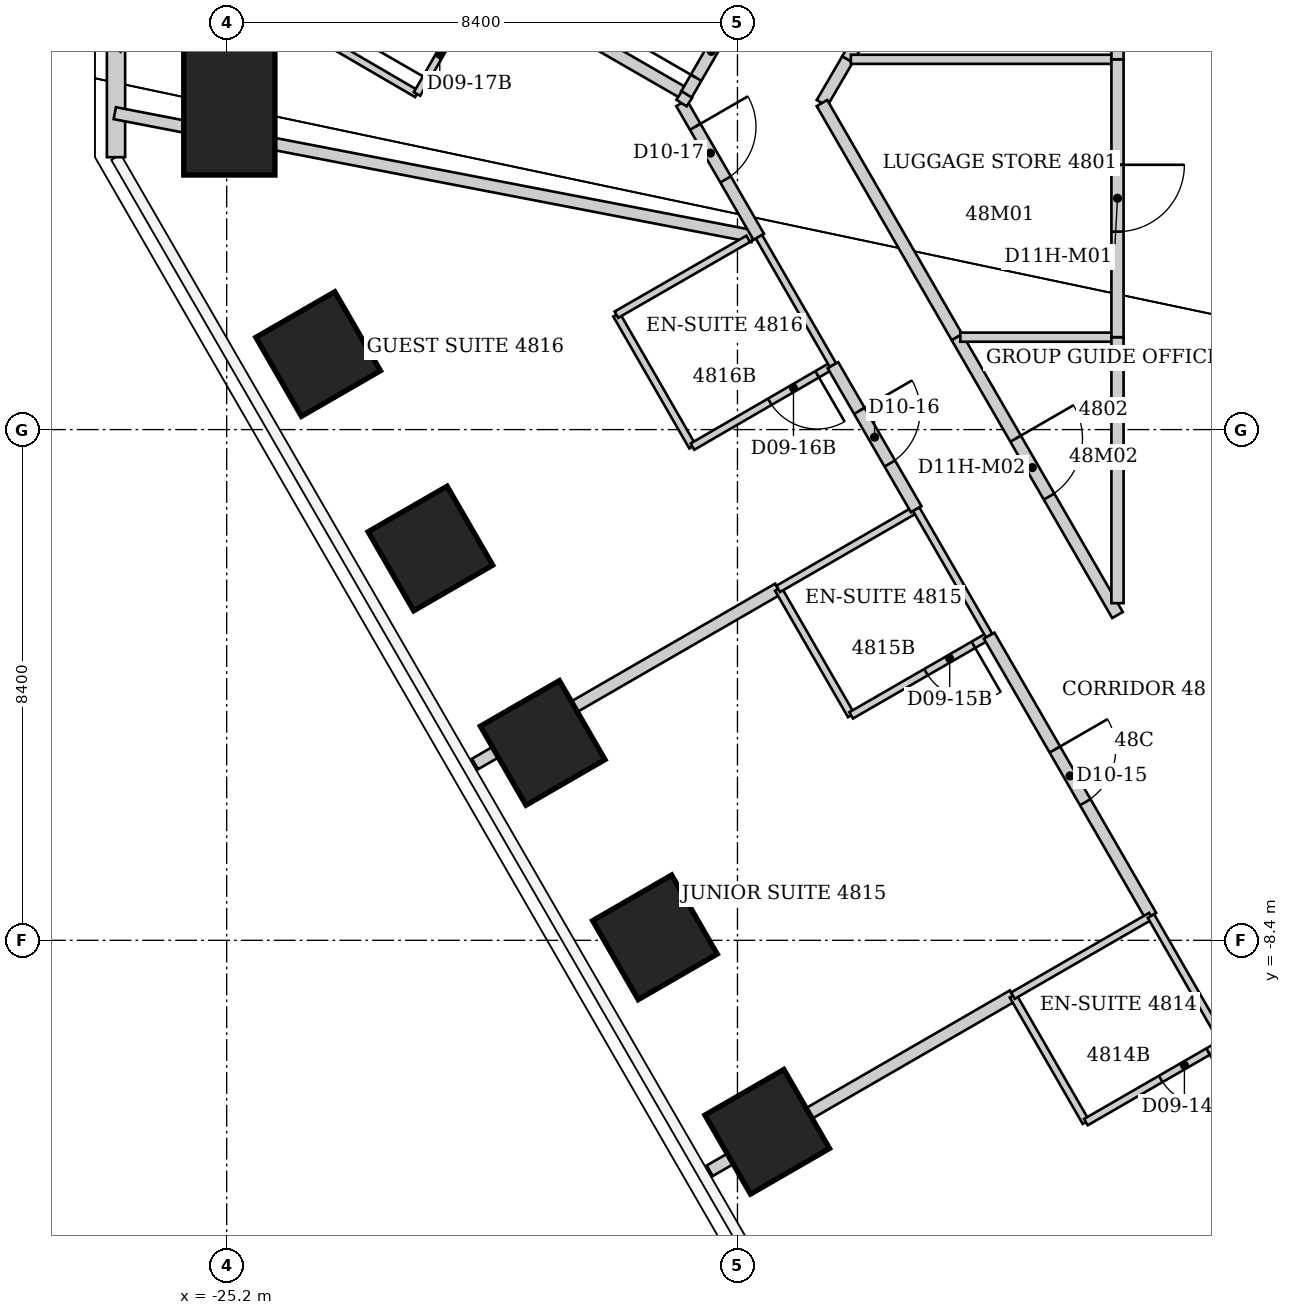
"""IFC4 building model, lengths in metres.
Left out: names, types, materials, properties, quantities, classifications, styles, units other than length and angle.
Written with IfcOpenShell. Run it as: python <this file> out.ifc"""

import sys

from ifc_helpers import new_model, si_unit, direction, frame, frame_2d, origin, origin_2d, place, context, subcontext, project, spatial, rectangle, extrude, element, fill, save


model = new_model("IFC4")
c1 = context("Model", 3, precision=1e-05, world=origin(), true_north=direction((0.0, 1.0)))
c2 = subcontext(c1, "Body", "Model", "MODEL_VIEW")
j1 = project(units=[si_unit("LENGTHUNIT", "METRE"), si_unit("PLANEANGLEUNIT", "RADIAN")], contexts=[c1])
p1 = place(None, origin())
s1 = spatial("IfcSite", under=j1, at=p1, CompositionType="ELEMENT")
p2 = place(p1, origin())
s2 = spatial("IfcBuilding", under=s1, at=p2, CompositionType="ELEMENT")
p3 = place(p2, frame((0.0, 0.0, 194.6)))
s3 = spatial("IfcBuildingStorey", under=s2, at=p3, CompositionType="ELEMENT", Elevation=194.6)
for number, where, z_axis, x_axis in (
    (1, (-16.311, -11.549, 0.0), (0.0, 0.0, 1.0), (-0.866, -0.5, 0.0)),
    (2, (-18.157, -8.351, 0.0), (0.0, 0.0, 1.0), (-0.866, -0.5, 0.0)),
    (3, (-20.003, -5.153, 0.0), (0.0, 0.0, 1.0), (-0.866, -0.5, 0.0)),
    (4, (-21.85, -1.956, 0.0), (0.0, 0.0, 1.0), (-0.866, -0.5, 0.0)),
    (5, (-23.696, 1.242, 0.0), (0.0, 0.0, 1.0), (-0.866, -0.5, 0.0)),
):
    element("IfcColumn", number, at=place(p3, frame(where, z_axis=z_axis, x_axis=x_axis)), inside=s3, PredefinedType="COLUMN", context=c2, shape_type="SweptSolid", body=[
        extrude(rectangle(XDim=1.5, YDim=1.5, at=origin_2d()), origin(), (0.0, 0.0, 1.0), 3.8),
    ])
p4 = place(p3, frame((-25.156, 5.311, 0.0), z_axis=(0.0, 0.0, 1.0), x_axis=(-1.0, 0.0, 0.0)))
e6 = element("IfcColumn", 6, at=p4, inside=s3, PredefinedType="COLUMN", context=c2, shape_type="SweptSolid", body=[
    extrude(rectangle(XDim=1.5, YDim=2.25, at=origin_2d()), origin(), (0.0, 0.0, 1.0), 3.8),
])
p5 = place(p3, frame((-27.02, 4.48, 0.0), z_axis=(0.0, 0.0, 1.0), x_axis=(0.0, 1.0, 0.0)))
e7 = element("IfcWall", 7, at=p5, inside=s3, PredefinedType="SOLIDWALL", context=c2, shape_type="SweptSolid", body=[
    extrude(rectangle(XDim=1.77, YDim=0.3, at=frame_2d((0.885, 0.0))), origin(), (0.0, 0.0, 1.0), 3.64),
])
p6 = place(p3, frame((-27.041, 5.204, 0.0), z_axis=(0.0, 0.0, 1.0), x_axis=(0.981884490433, -0.18948046719, 0.0)))
e8 = element("IfcWall", 8, at=p6, inside=s3, PredefinedType="PARTITIONING", context=c2, shape_type="SweptSolid", body=[
    extrude(rectangle(XDim=10.684, YDim=0.2, at=frame_2d((5.342, 0.0))), origin(), (0.0, 0.0, 1.0), 3.64),
])
p7 = place(p3, frame((-23.63, 6.43, 0.0), z_axis=(0.0, 0.0, 1.0), x_axis=(0.863773997337, -0.503879431535, 0.0)))
e9 = element("IfcWall", 9, at=p7, inside=s3, PredefinedType="PARTITIONING", context=c2, shape_type="SweptSolid", body=[
    extrude(rectangle(XDim=1.806, YDim=0.12, at=frame_2d((0.903, 0.0))), origin(), (0.0, 0.0, 1.0), 3.64),
])
p8 = place(p3, frame((-22.07, 5.52, 0.0), z_axis=(0.0, 0.0, 1.0), x_axis=(0.499118212815, 0.866533905648, 0.0)))
e10 = element("IfcWall", 10, at=p8, inside=s3, PredefinedType="PARTITIONING", context=c2, shape_type="SweptSolid", body=[
    extrude(rectangle(XDim=2.204, YDim=0.12, at=frame_2d((1.102, 0.0))), origin(), (0.0, 0.0, 1.0), 3.64),
])
p9 = place(p8, frame((0.3, 0.0, 0.0)))
e11 = element("IfcOpeningElement", 11, at=p9, cuts=e10, PredefinedType="OPENING", context=c2, shape_type="SweptSolid", body=[
    extrude(rectangle(XDim=0.9, YDim=2.03, at=frame_2d((0.45, 1.015))), frame((0.0, 0.06, 0.0), z_axis=(0.0, -1.0, 0.0), x_axis=(1.0, 0.0, 0.0)), (0.0, 0.0, 1.0), 0.12),
])
p10 = place(p3, frame((-21.116, -5.5, 0.0), z_axis=(0.0, 0.0, 1.0), x_axis=(0.865919350456, 0.50018364478, 0.0)))
e12 = element("IfcWall", 12, at=p10, inside=s3, PredefinedType="PARTITIONING", context=c2, shape_type="SweptSolid", body=[
    extrude(rectangle(XDim=5.758, YDim=0.2, at=frame_2d((2.879, 0.0))), origin(), (0.0, 0.0, 1.0), 3.64),
])
p11 = place(p3, frame((-20.97, 7.43, 0.0), z_axis=(0.0, 0.0, 1.0), x_axis=(0.866325681624, -0.499479542482, 0.0)))
e13 = element("IfcWall", 13, at=p11, inside=s3, PredefinedType="PARTITIONING", context=c2, shape_type="SweptSolid", body=[
    extrude(rectangle(XDim=3.829, YDim=0.2, at=frame_2d((1.914, 0.0))), origin(), (0.0, 0.0, 1.0), 3.64),
])
p12 = place(p3, frame((-18.79, 1.89, 0.0), z_axis=(0.0, 0.0, 1.0), x_axis=(0.499159685399, -0.866510016372, 0.0)))
e14 = element("IfcWall", 14, at=p12, inside=s3, PredefinedType="PARTITIONING", context=c2, shape_type="SweptSolid", body=[
    extrude(rectangle(XDim=2.504, YDim=0.12, at=frame_2d((1.252, 0.0))), origin(), (0.0, 0.0, 1.0), 3.64),
])
p13 = place(p3, frame((-17.72, 5.37, 0.0), z_axis=(0.0, 0.0, 1.0), x_axis=(0.499922110319, -0.866070368743, 0.0)))
e15 = element("IfcWall", 15, at=p13, inside=s3, PredefinedType="PARTITIONING", context=c2, shape_type="SweptSolid", body=[
    extrude(rectangle(XDim=2.541, YDim=0.2, at=frame_2d((1.27, 0.0))), origin(), (0.0, 0.0, 1.0), 3.64),
])
p14 = place(p13, frame((0.45, 0.0, 0.0)))
e16 = element("IfcOpeningElement", 16, at=p14, cuts=e15, PredefinedType="OPENING", context=c2, shape_type="SweptSolid", body=[
    extrude(rectangle(XDim=1.0, YDim=2.13, at=frame_2d((0.5, 1.065))), frame((0.0, 0.1, 0.0), z_axis=(0.0, -1.0, 0.0), x_axis=(1.0, 0.0, 0.0)), (0.0, 0.0, 1.0), 0.2),
])
p15 = place(p3, frame((-17.64, 5.51, 0.0), z_axis=(0.0, 0.0, 1.0), x_axis=(0.500014611105, 0.866016967894, 0.0)))
e17 = element("IfcWall", 17, at=p15, inside=s3, PredefinedType="PARTITIONING", context=c2, shape_type="SweptSolid", body=[
    extrude(rectangle(XDim=1.64, YDim=0.2, at=frame_2d((0.82, 0.0))), origin(), (0.0, 0.0, 1.0), 3.64),
])
p16 = place(p15, frame((0.32, 0.0, 0.0)))
e18 = element("IfcOpeningElement", 18, at=p16, cuts=e17, PredefinedType="OPENING", context=c2, shape_type="SweptSolid", body=[
    extrude(rectangle(XDim=1.0, YDim=2.13, at=frame_2d((0.5, 1.065))), frame((0.0, 0.1, 0.0), z_axis=(0.0, -1.0, 0.0), x_axis=(1.0, 0.0, 0.0)), (0.0, 0.0, 1.0), 0.2),
])
p17 = place(p3, frame((-17.63, 5.51, 0.0), z_axis=(0.0, 0.0, 1.0), x_axis=(-0.541424846284, -0.840749151547, 0.0)))
e19 = element("IfcWall", 19, at=p17, inside=s3, PredefinedType="PARTITIONING", context=c2, shape_type="SweptSolid", body=[
    extrude(rectangle(XDim=0.167, YDim=0.2, at=frame_2d((0.083, 0.0))), origin(), (0.0, 0.0, 1.0), 3.64),
])
p18 = place(p3, frame((-17.54, -0.28, 0.0), z_axis=(0.0, 0.0, 1.0), x_axis=(0.86498992408, 0.501789229896, 0.0)))
e20 = element("IfcWall", 20, at=p18, inside=s3, PredefinedType="PARTITIONING", context=c2, shape_type="SweptSolid", body=[
    extrude(rectangle(XDim=2.671, YDim=0.12, at=frame_2d((1.335, 0.0))), origin(), (0.0, 0.0, 1.0), 3.64),
])
p19 = place(p18, frame((1.47, 0.0, 0.0)))
e21 = element("IfcOpeningElement", 21, at=p19, cuts=e20, PredefinedType="OPENING", context=c2, shape_type="SweptSolid", body=[
    extrude(rectangle(XDim=0.9, YDim=2.03, at=frame_2d((0.45, 1.015))), frame((0.0, 0.06, 0.0), z_axis=(0.0, -1.0, 0.0), x_axis=(1.0, 0.0, 0.0)), (0.0, 0.0, 1.0), 0.12),
])
p20 = place(p3, frame((-17.256, -12.19, 0.0), z_axis=(0.0, 0.0, 1.0), x_axis=(0.865937714159, 0.500151852138, 0.0)))
e22 = element("IfcWall", 22, at=p20, inside=s3, PredefinedType="PARTITIONING", context=c2, shape_type="SweptSolid", body=[
    extrude(rectangle(XDim=5.758, YDim=0.2, at=frame_2d((2.879, 0.0))), origin(), (0.0, 0.0, 1.0), 3.038),
])
p21 = place(p3, frame((-16.624, 3.138, 0.0), z_axis=(0.0, 0.0, 1.0), x_axis=(-0.866525185869, -0.499133351175, 0.0)))
e23 = element("IfcWall", 23, at=p21, inside=s3, PredefinedType="PARTITIONING", context=c2, shape_type="SweptSolid", body=[
    extrude(rectangle(XDim=2.5, YDim=0.12, at=frame_2d((1.25, 0.0))), origin(), (0.0, 0.0, 1.0), 3.038),
])
p22 = place(p3, frame((-16.447, 3.172, 0.0), z_axis=(0.0, 0.0, 1.0), x_axis=(0.499242543719, -0.86646227993, 0.0)))
e24 = element("IfcWall", 24, at=p22, inside=s3, PredefinedType="PARTITIONING", context=c2, shape_type="SweptSolid", body=[
    extrude(rectangle(XDim=2.437, YDim=0.12, at=frame_2d((1.219, 0.0))), origin(), (0.0, 0.0, 1.0), 3.64),
])
p23 = place(p3, frame((-16.13, -2.62, 0.0), z_axis=(0.0, 0.0, 1.0), x_axis=(0.499737123639, -0.866177122335, 0.0)))
e25 = element("IfcWall", 25, at=p23, inside=s3, PredefinedType="PARTITIONING", context=c2, shape_type="SweptSolid", body=[
    extrude(rectangle(XDim=2.401, YDim=0.12, at=frame_2d((1.201, 0.0))), origin(), (0.0, 0.0, 1.0), 3.64),
])
p24 = place(p3, frame((-16.13, -2.62, 0.0), z_axis=(0.0, 0.0, 1.0), x_axis=(0.866114241029, 0.499846097802, 0.0)))
e26 = element("IfcWall", 26, at=p24, inside=s3, PredefinedType="PARTITIONING", context=c2, shape_type="SweptSolid", body=[
    extrude(rectangle(XDim=2.621, YDim=0.12, at=frame_2d((1.311, 0.0))), origin(), (0.0, 0.0, 1.0), 3.64),
])
p25 = place(p3, frame((-15.41, 5.37, 0.0), z_axis=(0.0, 0.0, 1.0), x_axis=(0.503943891868, 0.863736391412, 0.0)))
e27 = element("IfcWall", 27, at=p25, inside=s3, PredefinedType="PARTITIONING", context=c2, shape_type="SweptSolid", body=[
    extrude(rectangle(XDim=0.833, YDim=0.2, at=frame_2d((0.417, 0.0))), origin(), (0.0, 0.0, 1.0), 3.64),
])
p26 = place(p3, frame((-15.23, 1.06, 0.0), z_axis=(0.0, 0.0, 1.0), x_axis=(0.500406860043, -0.865790375565, 0.0)))
e28 = element("IfcWall", 28, at=p26, inside=s3, PredefinedType="PARTITIONING", context=c2, shape_type="SweptSolid", body=[
    extrude(rectangle(XDim=2.738, YDim=0.2, at=frame_2d((1.369, 0.0))), origin(), (0.0, 0.0, 1.0), 3.64),
])
p27 = place(p26, frame((0.869, 0.0, 0.0)))
e29 = element("IfcOpeningElement", 29, at=p27, cuts=e28, PredefinedType="OPENING", context=c2, shape_type="SweptSolid", body=[
    extrude(rectangle(XDim=1.0, YDim=2.13, at=frame_2d((0.5, 1.065))), frame((0.0, 0.1, 0.0), z_axis=(0.0, -1.0, 0.0), x_axis=(1.0, 0.0, 0.0)), (0.0, 0.0, 1.0), 0.2),
])
p28 = place(p3, frame((-14.99, 6.09, 0.0), z_axis=(0.0, 0.0, 1.0), x_axis=(0.500213626659, 0.86590203124, 0.0)))
e30 = element("IfcWall", 30, at=p28, inside=s3, PredefinedType="PARTITIONING", context=c2, shape_type="SweptSolid", body=[
    extrude(rectangle(XDim=5.278, YDim=0.2, at=frame_2d((2.639, 0.0))), origin(), (0.0, 0.0, 1.0), 3.64),
])
p29 = place(p3, frame((-14.935, 6.09, 0.0), z_axis=(0.0, 0.0, 1.0), x_axis=(1.0, 0.0, 0.0)))
e31 = element("IfcWall", 31, at=p29, inside=s3, PredefinedType="PARTITIONING", context=c2, shape_type="SweptSolid", body=[
    extrude(rectangle(XDim=4.385, YDim=0.15, at=frame_2d((2.192, 0.0))), origin(), (0.0, 0.0, 1.0), 3.64),
])
p30 = place(p3, frame((-14.93, -4.7, 0.0), z_axis=(0.0, 0.0, 1.0), x_axis=(0.866114241029, 0.499846097802, 0.0)))
e32 = element("IfcWall", 32, at=p30, inside=s3, PredefinedType="PARTITIONING", context=c2, shape_type="SweptSolid", body=[
    extrude(rectangle(XDim=2.621, YDim=0.12, at=frame_2d((1.311, 0.0))), origin(), (0.0, 0.0, 1.0), 3.64),
])
p31 = place(p30, frame((1.421, 0.0, 0.0)))
e33 = element("IfcOpeningElement", 33, at=p31, cuts=e32, PredefinedType="OPENING", context=c2, shape_type="SweptSolid", body=[
    extrude(rectangle(XDim=0.9, YDim=2.03, at=frame_2d((0.45, 1.015))), frame((0.0, 0.06, 0.0), z_axis=(0.0, -1.0, 0.0), x_axis=(1.0, 0.0, 0.0)), (0.0, 0.0, 1.0), 0.12),
])
p32 = place(p3, frame((-13.86, -1.31, 0.0), z_axis=(0.0, 0.0, 1.0), x_axis=(0.499813401482, -0.866133109688, 0.0)))
e34 = element("IfcWall", 34, at=p32, inside=s3, PredefinedType="PARTITIONING", context=c2, shape_type="SweptSolid", body=[
    extrude(rectangle(XDim=2.401, YDim=0.12, at=frame_2d((1.201, 0.0))), origin(), (0.0, 0.0, 1.0), 3.64),
])
p33 = place(p3, frame((-13.19, 1.52, 0.0), z_axis=(0.0, 0.0, 1.0), x_axis=(-0.499513190454, 0.866306281036, 0.0)))
e35 = element("IfcWall", 35, at=p33, inside=s3, PredefinedType="PARTITIONING", context=c2, shape_type="SweptSolid", body=[
    extrude(rectangle(XDim=4.444, YDim=0.2, at=frame_2d((2.222, 0.0))), origin(), (0.0, 0.0, 1.0), 3.64),
])
p34 = place(p3, frame((-12.66, -3.39, 0.0), z_axis=(0.0, 0.0, 1.0), x_axis=(0.499755544815, -0.866166494057, 0.0)))
e36 = element("IfcWall", 36, at=p34, inside=s3, PredefinedType="PARTITIONING", context=c2, shape_type="SweptSolid", body=[
    extrude(rectangle(XDim=5.323, YDim=0.2, at=frame_2d((2.661, 0.0))), origin(), (0.0, 0.0, 1.0), 3.64),
])
p35 = place(p34, frame((2.161, 0.0, 0.0)))
e37 = element("IfcOpeningElement", 37, at=p35, cuts=e36, PredefinedType="OPENING", context=c2, shape_type="SweptSolid", body=[
    extrude(rectangle(XDim=1.0, YDim=2.13, at=frame_2d((0.5, 1.065))), frame((0.0, 0.1, 0.0), z_axis=(0.0, -1.0, 0.0), x_axis=(1.0, 0.0, 0.0)), (0.0, 0.0, 1.0), 0.2),
])
p36 = place(p3, frame((-12.27, -9.31, 0.0), z_axis=(0.0, 0.0, 1.0), x_axis=(0.499737123639, -0.866177122335, 0.0)))
e38 = element("IfcWall", 38, at=p36, inside=s3, PredefinedType="PARTITIONING", context=c2, shape_type="SweptSolid", body=[
    extrude(rectangle(XDim=2.401, YDim=0.12, at=frame_2d((1.201, 0.0))), origin(), (0.0, 0.0, 1.0), 3.64),
])
p37 = place(p3, frame((-12.27, -9.31, 0.0), z_axis=(0.0, 0.0, 1.0), x_axis=(0.866114241029, 0.499846097802, 0.0)))
e39 = element("IfcWall", 39, at=p37, inside=s3, PredefinedType="PARTITIONING", context=c2, shape_type="SweptSolid", body=[
    extrude(rectangle(XDim=2.621, YDim=0.12, at=frame_2d((1.311, 0.0))), origin(), (0.0, 0.0, 1.0), 3.038),
])
p38 = place(p3, frame((-11.07, -11.39, 0.0), z_axis=(0.0, 0.0, 1.0), x_axis=(0.866154567199, 0.49977621564, 0.0)))
e40 = element("IfcWall", 40, at=p38, inside=s3, PredefinedType="PARTITIONING", context=c2, shape_type="SweptSolid", body=[
    extrude(rectangle(XDim=2.621, YDim=0.12, at=frame_2d((1.311, 0.0))), origin(), (0.0, 0.0, 1.0), 3.64),
])
p39 = place(p38, frame((1.421, 0.0, 0.0)))
e41 = element("IfcOpeningElement", 41, at=p39, cuts=e40, PredefinedType="OPENING", context=c2, shape_type="SweptSolid", body=[
    extrude(rectangle(XDim=0.9, YDim=2.03, at=frame_2d((0.45, 1.015))), frame((0.0, 0.06, 0.0), z_axis=(0.0, -1.0, 0.0), x_axis=(1.0, 0.0, 0.0)), (0.0, 0.0, 1.0), 0.12),
])
p40 = place(p3, frame((-10.55, -3.05, 0.0), z_axis=(0.0, 0.0, 1.0), x_axis=(-0.500193590286, 0.865913605527, 0.0)))
e42 = element("IfcWall", 42, at=p40, inside=s3, PredefinedType="PARTITIONING", context=c2, shape_type="SweptSolid", body=[
    extrude(rectangle(XDim=5.278, YDim=0.2, at=frame_2d((2.639, 0.0))), origin(), (0.0, 0.0, 1.0), 3.64),
])
p41 = place(p40, frame((2.25, 0.0, 0.0)))
e43 = element("IfcOpeningElement", 43, at=p41, cuts=e42, PredefinedType="OPENING", context=c2, shape_type="SweptSolid", body=[
    extrude(rectangle(XDim=1.1, YDim=2.2, at=frame_2d((0.55, 1.1))), frame((0.0, 0.1, 0.0), z_axis=(0.0, -1.0, 0.0), x_axis=(1.0, 0.0, 0.0)), (0.0, 0.0, 1.0), 0.2),
])
p42 = place(p3, frame((-10.55, 1.52, 0.0), z_axis=(0.0, 0.0, 1.0), x_axis=(-1.0, 0.0, 0.0)))
e44 = element("IfcWall", 44, at=p42, inside=s3, PredefinedType="PARTITIONING", context=c2, shape_type="SweptSolid", body=[
    extrude(rectangle(XDim=2.585, YDim=0.15, at=frame_2d((1.292, 0.0))), origin(), (0.0, 0.0, 1.0), 3.64),
])
p43 = place(p3, frame((-10.55, 1.52, 0.0), z_axis=(0.0, 0.0, 1.0), x_axis=(0.0, -1.0, 0.0)))
e45 = element("IfcWall", 45, at=p43, inside=s3, PredefinedType="PARTITIONING", context=c2, shape_type="SweptSolid", body=[
    extrude(rectangle(XDim=4.375, YDim=0.2, at=frame_2d((2.188, 0.0))), origin(), (0.0, 0.0, 1.0), 3.64),
])
p44 = place(p3, frame((-10.55, 6.09, 0.0), z_axis=(0.0, 0.0, 1.0), x_axis=(0.0, -1.0, 0.0)))
e46 = element("IfcWall", 46, at=p44, inside=s3, PredefinedType="PARTITIONING", context=c2, shape_type="SweptSolid", body=[
    extrude(rectangle(XDim=4.57, YDim=0.2, at=frame_2d((2.285, 0.0))), origin(), (0.0, 0.0, 1.0), 3.64),
])
p45 = place(p44, frame((1.735, 0.0, 0.0)))
e47 = element("IfcOpeningElement", 47, at=p45, cuts=e46, PredefinedType="OPENING", context=c2, shape_type="SweptSolid", body=[
    extrude(rectangle(XDim=1.1, YDim=2.2, at=frame_2d((0.55, 1.1))), frame((0.0, 0.1, 0.0), z_axis=(0.0, -1.0, 0.0), x_axis=(1.0, 0.0, 0.0)), (0.0, 0.0, 1.0), 0.2),
])
p46 = place(p3, frame((-10.55, 8.89, 0.0), z_axis=(0.0, 0.0, 1.0), x_axis=(0.0, -1.0, 0.0)))
e48 = element("IfcWall", 48, at=p46, inside=s3, PredefinedType="PARTITIONING", context=c2, shape_type="SweptSolid", body=[
    extrude(rectangle(XDim=2.8, YDim=0.2, at=frame_2d((1.4, 0.0))), origin(), (0.0, 0.0, 1.0), 3.64),
])
p47 = place(p3, frame((-10.0, -8.0, 0.0), z_axis=(0.0, 0.0, 1.0), x_axis=(0.498862637731, -0.866681065142, 0.0)))
e49 = element("IfcWall", 49, at=p47, inside=s3, PredefinedType="PARTITIONING", context=c2, shape_type="SweptSolid", body=[
    extrude(rectangle(XDim=2.401, YDim=0.12, at=frame_2d((1.201, 0.0))), origin(), (0.0, 0.0, 1.0), 3.64),
])
p48 = place(p39, origin())
e50 = element("IfcDoor", 50, at=p48, inside=s3, OperationType="SINGLE_SWING_RIGHT", PredefinedType="DOOR", context=c2, shape_type="SweptSolid", body=[
    extrude(rectangle(XDim=0.9, YDim=2.03, at=frame_2d((0.45, 1.015))), frame((0.0, 0.025, 0.0), z_axis=(0.0, -1.0, 0.0), x_axis=(1.0, 0.0, 0.0)), (0.0, 0.0, 1.0), 0.05),
])
fill(e41, e50)
p49 = place(p35, origin())
e51 = element("IfcDoor", 51, at=p49, inside=s3, OperationType="SINGLE_SWING_LEFT", PredefinedType="DOOR", context=c2, shape_type="SweptSolid", body=[
    extrude(rectangle(XDim=1.0, YDim=2.13, at=frame_2d((0.5, 1.065))), frame((0.0, 0.025, 0.0), z_axis=(0.0, -1.0, 0.0), x_axis=(1.0, 0.0, 0.0)), (0.0, 0.0, 1.0), 0.05),
])
fill(e37, e51)
p50 = place(p31, origin())
e52 = element("IfcDoor", 52, at=p50, inside=s3, OperationType="SINGLE_SWING_RIGHT", PredefinedType="DOOR", context=c2, shape_type="SweptSolid", body=[
    extrude(rectangle(XDim=0.9, YDim=2.03, at=frame_2d((0.45, 1.015))), frame((0.0, 0.025, 0.0), z_axis=(0.0, -1.0, 0.0), x_axis=(1.0, 0.0, 0.0)), (0.0, 0.0, 1.0), 0.05),
])
fill(e33, e52)
p51 = place(p27, origin())
e53 = element("IfcDoor", 53, at=p51, inside=s3, OperationType="SINGLE_SWING_LEFT", PredefinedType="DOOR", context=c2, shape_type="SweptSolid", body=[
    extrude(rectangle(XDim=1.0, YDim=2.13, at=frame_2d((0.5, 1.065))), frame((0.0, 0.025, 0.0), z_axis=(0.0, -1.0, 0.0), x_axis=(1.0, 0.0, 0.0)), (0.0, 0.0, 1.0), 0.05),
])
fill(e29, e53)
p52 = place(p19, origin())
e54 = element("IfcDoor", 54, at=p52, inside=s3, OperationType="SINGLE_SWING_RIGHT", PredefinedType="DOOR", context=c2, shape_type="SweptSolid", body=[
    extrude(rectangle(XDim=0.9, YDim=2.03, at=frame_2d((0.45, 1.015))), frame((0.0, 0.025, 0.0), z_axis=(0.0, -1.0, 0.0), x_axis=(1.0, 0.0, 0.0)), (0.0, 0.0, 1.0), 0.05),
])
fill(e21, e54)
p53 = place(p14, origin())
e55 = element("IfcDoor", 55, at=p53, inside=s3, OperationType="SINGLE_SWING_LEFT", PredefinedType="DOOR", context=c2, shape_type="SweptSolid", body=[
    extrude(rectangle(XDim=1.0, YDim=2.13, at=frame_2d((0.5, 1.065))), frame((0.0, 0.025, 0.0), z_axis=(0.0, -1.0, 0.0), x_axis=(1.0, 0.0, 0.0)), (0.0, 0.0, 1.0), 0.05),
])
fill(e16, e55)
p54 = place(p9, origin())
e56 = element("IfcDoor", 56, at=p54, inside=s3, OperationType="SINGLE_SWING_LEFT", PredefinedType="DOOR", context=c2, shape_type="SweptSolid", body=[
    extrude(rectangle(XDim=0.9, YDim=2.03, at=frame_2d((0.45, 1.015))), frame((0.0, 0.025, 0.0), z_axis=(0.0, -1.0, 0.0), x_axis=(1.0, 0.0, 0.0)), (0.0, 0.0, 1.0), 0.05),
])
fill(e11, e56)
p55 = place(p16, origin())
e57 = element("IfcDoor", 57, at=p55, inside=s3, OperationType="SINGLE_SWING_LEFT", PredefinedType="DOOR", context=c2, shape_type="SweptSolid", body=[
    extrude(rectangle(XDim=1.0, YDim=2.13, at=frame_2d((0.5, 1.065))), frame((0.0, 0.025, 0.0), z_axis=(0.0, -1.0, 0.0), x_axis=(1.0, 0.0, 0.0)), (0.0, 0.0, 1.0), 0.05),
])
fill(e18, e57)
p56 = place(p45, origin())
e58 = element("IfcDoor", 58, at=p56, inside=s3, OperationType="SINGLE_SWING_LEFT", PredefinedType="DOOR", context=c2, shape_type="SweptSolid", body=[
    extrude(rectangle(XDim=1.1, YDim=2.2, at=frame_2d((0.55, 1.1))), frame((0.0, 0.025, 0.0), z_axis=(0.0, -1.0, 0.0), x_axis=(1.0, 0.0, 0.0)), (0.0, 0.0, 1.0), 0.05),
])
fill(e47, e58)
p57 = place(p41, origin())
e59 = element("IfcDoor", 59, at=p57, inside=s3, OperationType="SINGLE_SWING_RIGHT", PredefinedType="DOOR", context=c2, shape_type="SweptSolid", body=[
    extrude(rectangle(XDim=1.1, YDim=2.2, at=frame_2d((0.55, 1.1))), frame((0.0, 0.025, 0.0), z_axis=(0.0, -1.0, 0.0), x_axis=(1.0, 0.0, 0.0)), (0.0, 0.0, 1.0), 0.05),
])
fill(e43, e59)
save(model, sys.argv[1])
